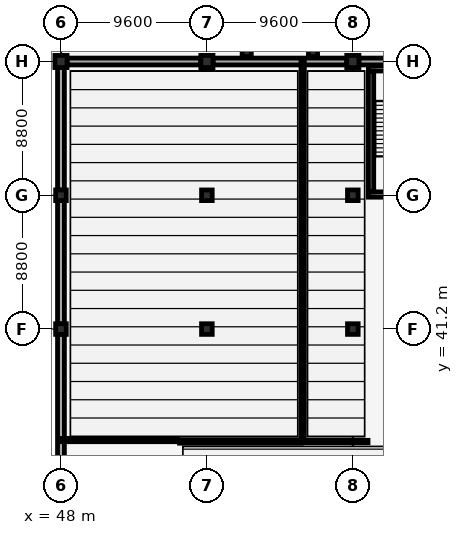
"""IFC4 building model, lengths in metres.
Left out: names, types, materials, properties, quantities, classifications, styles, units other than length and angle.
Written with IfcOpenShell. Run it as: python <this file> out.ifc"""

import sys

from ifc_helpers import new_model, si_unit, direction, frame, frame_2d, origin, origin_2d, place, context, subcontext, project, spatial, rectangle, extrude, element, fill, save


model = new_model("IFC4")
c1 = context("Model", 3, precision=1e-05, world=origin(), true_north=direction((0.0, 1.0)))
c2 = subcontext(c1, "Body", "Model", "MODEL_VIEW")
j1 = project(units=[si_unit("LENGTHUNIT", "METRE"), si_unit("PLANEANGLEUNIT", "RADIAN")], contexts=[c1])
p1 = place(None, origin())
s1 = spatial("IfcSite", under=j1, at=p1, CompositionType="ELEMENT")
p2 = place(p1, origin())
s2 = spatial("IfcBuilding", under=s1, at=p2, CompositionType="ELEMENT")
p3 = place(p2, frame((0.0, 0.0, -4.2)))
s3 = spatial("IfcBuildingStorey", under=s2, at=p3, CompositionType="ELEMENT", Elevation=-4.2)
for number, where, z_axis, x_axis in (
    (1, (48.0, 41.2, 0.0), (0.0, 0.0, 1.0), (1.0, 0.0, 0.0)),
    (2, (48.0, 50.0, 0.0), (0.0, 0.0, 1.0), (1.0, 0.0, 0.0)),
):
    element("IfcColumn", number, at=place(p3, frame(where, z_axis=z_axis, x_axis=x_axis)), inside=s3, PredefinedType="COLUMN", context=c2, shape_type="SweptSolid", body=[
        extrude(rectangle(XDim=0.7, YDim=0.7, at=origin_2d()), origin(), (0.0, 0.0, 1.0), 4.2),
    ])
p4 = place(p3, frame((48.0, 58.8, 0.0), z_axis=(0.0, 0.0, 1.0), x_axis=(1.0, 0.0, 0.0)))
e3 = element("IfcColumn", 3, at=p4, inside=s3, PredefinedType="COLUMN", context=c2, shape_type="SweptSolid", body=[
    extrude(rectangle(XDim=0.8, YDim=0.8, at=origin_2d()), origin(), (0.0, 0.0, 1.0), 4.2),
])
for number, where, z_axis, x_axis in (
    (4, (57.6, 41.2, 0.0), (0.0, 0.0, 1.0), (1.0, 0.0, 0.0)),
    (5, (57.6, 50.0, 0.0), (0.0, 0.0, 1.0), (1.0, 0.0, 0.0)),
):
    element("IfcColumn", number, at=place(p3, frame(where, z_axis=z_axis, x_axis=x_axis)), inside=s3, PredefinedType="COLUMN", context=c2, shape_type="SweptSolid", body=[
        extrude(rectangle(XDim=0.7, YDim=0.7, at=origin_2d()), origin(), (0.0, 0.0, 1.0), 4.2),
    ])
p5 = place(p3, frame((57.6, 58.8, 0.0), z_axis=(0.0, 0.0, 1.0), x_axis=(1.0, 0.0, 0.0)))
e6 = element("IfcColumn", 6, at=p5, inside=s3, PredefinedType="COLUMN", context=c2, shape_type="SweptSolid", body=[
    extrude(rectangle(XDim=0.8, YDim=0.8, at=origin_2d()), origin(), (0.0, 0.0, 1.0), 4.2),
])
for number, where, z_axis, x_axis in (
    (7, (67.2, 41.2, 0.0), (0.0, 0.0, 1.0), (1.0, 0.0, 0.0)),
    (8, (67.2, 50.0, 0.0), (0.0, 0.0, 1.0), (1.0, 0.0, 0.0)),
):
    element("IfcColumn", number, at=place(p3, frame(where, z_axis=z_axis, x_axis=x_axis)), inside=s3, PredefinedType="COLUMN", context=c2, shape_type="SweptSolid", body=[
        extrude(rectangle(XDim=0.7, YDim=0.7, at=origin_2d()), origin(), (0.0, 0.0, 1.0), 4.2),
    ])
p6 = place(p3, frame((67.2, 58.8, 0.0), z_axis=(0.0, 0.0, 1.0), x_axis=(1.0, 0.0, 0.0)))
e9 = element("IfcColumn", 9, at=p6, inside=s3, PredefinedType="COLUMN", context=c2, shape_type="SweptSolid", body=[
    extrude(rectangle(XDim=0.8, YDim=0.8, at=origin_2d()), origin(), (0.0, 0.0, 1.0), 4.2),
])
p7 = place(p3, frame((76.4, 58.8, 0.0), z_axis=(0.0, 0.0, 1.0), x_axis=(-1.0, 0.0, 0.0)))
e10 = element("IfcWall", 10, at=p7, inside=s3, PredefinedType="SOLIDWALL", context=c2, shape_type="SweptSolid", body=[
    extrude(rectangle(XDim=8.8, YDim=0.45, at=frame_2d((4.4, 0.0))), origin(), (0.0, 0.0, 1.0), 3.84),
])
for number, where, z_axis, x_axis in (
    (11, (66.8, 58.8, 0.0), (0.0, 0.0, 1.0), (-1.0, 0.0, 0.0)),
    (12, (57.2, 58.8, 0.0), (0.0, 0.0, 1.0), (-1.0, 0.0, 0.0)),
):
    element("IfcWall", number, at=place(p3, frame(where, z_axis=z_axis, x_axis=x_axis)), inside=s3, PredefinedType="SOLIDWALL", context=c2, shape_type="SweptSolid", body=[
        extrude(rectangle(XDim=8.8, YDim=0.45, at=frame_2d((4.4, 0.0))), origin(), (0.0, 0.0, 1.0), 3.84),
    ])
p8 = place(p3, frame((48.0, 58.4, 0.0), z_axis=(0.0, 0.0, 1.0), x_axis=(0.0, -1.0, 0.0)))
e13 = element("IfcWall", 13, at=p8, inside=s3, PredefinedType="SOLIDWALL", context=c2, shape_type="SweptSolid", body=[
    extrude(rectangle(XDim=8.05, YDim=0.45, at=frame_2d((4.025, 0.0))), origin(), (0.0, 0.0, 1.0), 3.84),
])
p9 = place(p3, frame((48.0, 49.65, 0.0), z_axis=(0.0, 0.0, 1.0), x_axis=(0.0, -1.0, 0.0)))
e14 = element("IfcWall", 14, at=p9, inside=s3, PredefinedType="SOLIDWALL", context=c2, shape_type="SweptSolid", body=[
    extrude(rectangle(XDim=8.1, YDim=0.45, at=frame_2d((4.05, 0.0))), origin(), (0.0, 0.0, 1.0), 3.84),
])
p10 = place(p3, frame((48.0, 40.85, 0.0), z_axis=(0.0, 0.0, 1.0), x_axis=(0.0, -1.0, 0.0)))
e15 = element("IfcWall", 15, at=p10, inside=s3, PredefinedType="SOLIDWALL", context=c2, shape_type="SweptSolid", body=[
    extrude(rectangle(XDim=8.1, YDim=0.45, at=frame_2d((4.05, 0.0))), origin(), (0.0, 0.0, 1.0), 3.84),
])
for number, where, z_axis, x_axis in (
    (16, (60.22, 59.42, 0.0), (0.0, 0.0, 1.0), (1.0, 0.0, 0.0)),
    (17, (64.58, 59.42, 0.0), (0.0, 0.0, 1.0), (1.0, 0.0, 0.0)),
):
    element("IfcColumn", number, at=place(p3, frame(where, z_axis=z_axis, x_axis=x_axis)), inside=s3, PredefinedType="COLUMN", context=c2, shape_type="SweptSolid", body=[
        extrude(rectangle(XDim=0.6, YDim=0.6, at=origin_2d()), origin(), (0.0, 0.0, 1.0), 4.2),
    ])
for number, where, z_axis, x_axis in (
    (18, (73.875, 50.05, 0.0), (0.0, 0.0, 1.0), (-1.0, 0.0, 0.0)),
    (19, (68.225, 58.35, 0.0), (0.0, 0.0, 1.0), (1.0, 0.0, 0.0)),
):
    element("IfcWall", number, at=place(p3, frame(where, z_axis=z_axis, x_axis=x_axis)), inside=s3, PredefinedType="SHEAR", context=c2, shape_type="SweptSolid", body=[
        extrude(rectangle(XDim=5.65, YDim=0.35, at=frame_2d((2.825, 0.0))), origin(), (0.0, 0.0, 1.0), 3.95),
    ])
p11 = place(p3, frame((68.4, 50.225, 0.0), z_axis=(0.0, 0.0, 1.0), x_axis=(0.0, 1.0, 0.0)))
e20 = element("IfcWall", 20, at=p11, inside=s3, PredefinedType="SHEAR", context=c2, shape_type="SweptSolid", body=[
    extrude(rectangle(XDim=7.95, YDim=0.35, at=frame_2d((3.975, 0.0))), origin(), (0.0, 0.0, 1.0), 3.95),
])
p12 = place(p11, frame((0.22, 0.0, 0.0)))
e21 = element("IfcOpeningElement", 21, at=p12, cuts=e20, PredefinedType="OPENING", context=c2, shape_type="SweptSolid", body=[
    extrude(rectangle(XDim=2.05, YDim=2.15, at=frame_2d((1.025, 1.075))), frame((0.0, 0.185, 0.0), z_axis=(0.0, -1.0, 0.0), x_axis=(1.0, 0.0, 0.0)), (0.0, 0.0, 1.0), 0.37),
])
p13 = place(p3, frame((64.0, 33.8, 0.0), z_axis=(0.0, 0.0, 1.0), x_axis=(1.0, 0.0, 0.0)))
e22 = element("IfcWall", 22, at=p13, inside=s3, PredefinedType="PARTITIONING", context=c2, shape_type="SweptSolid", body=[
    extrude(rectangle(XDim=4.2, YDim=0.16, at=frame_2d((2.1, 0.0))), origin(), (0.0, 0.0, 1.0), 3.84),
])
p14 = place(p13, frame((0.36, 0.0, 0.0)))
e23 = element("IfcOpeningElement", 23, at=p14, cuts=e22, PredefinedType="OPENING", context=c2, shape_type="SweptSolid", body=[
    extrude(rectangle(XDim=1.8, YDim=2.15, at=frame_2d((0.9, 1.075))), frame((0.0, 0.09, 0.0), z_axis=(0.0, -1.0, 0.0), x_axis=(1.0, 0.0, 0.0)), (0.0, 0.0, 1.0), 0.18),
])
p15 = place(p3, frame((55.8, 33.8, 0.0), z_axis=(0.0, 0.0, 1.0), x_axis=(1.0, 0.0, 0.0)))
e24 = element("IfcWall", 24, at=p15, inside=s3, PredefinedType="PARTITIONING", context=c2, shape_type="SweptSolid", body=[
    extrude(rectangle(XDim=8.0, YDim=0.22, at=frame_2d((4.0, 0.0))), origin(), (0.0, 0.0, 1.0), 3.84),
])
p16 = place(p15, frame((3.25, 0.0, 0.0)))
e25 = element("IfcOpeningElement", 25, at=p16, cuts=e24, PredefinedType="OPENING", context=c2, shape_type="SweptSolid", body=[
    extrude(rectangle(XDim=1.5, YDim=2.2, at=frame_2d((0.75, 1.1))), frame((0.0, 0.12, 0.0), z_axis=(0.0, -1.0, 0.0), x_axis=(1.0, 0.0, 0.0)), (0.0, 0.0, 1.0), 0.24),
])
p17 = place(p3, frame((63.9, 33.9, 0.0), z_axis=(0.0, 0.0, 1.0), x_axis=(0.0, 1.0, 0.0)))
e26 = element("IfcWall", 26, at=p17, inside=s3, PredefinedType="PARTITIONING", context=c2, shape_type="SweptSolid", body=[
    extrude(rectangle(XDim=24.85, YDim=0.22, at=frame_2d((12.425, 0.0))), origin(), (0.0, 0.0, 1.0), 3.84),
])
p18 = place(p17, frame((11.675, 0.0, 0.0)))
e27 = element("IfcOpeningElement", 27, at=p18, cuts=e26, PredefinedType="OPENING", context=c2, shape_type="SweptSolid", body=[
    extrude(rectangle(XDim=1.5, YDim=2.2, at=frame_2d((0.75, 1.1))), frame((0.0, 0.12, 0.0), z_axis=(0.0, -1.0, 0.0), x_axis=(1.0, 0.0, 0.0)), (0.0, 0.0, 1.0), 0.24),
])
p19 = place(p3, frame((48.05, 33.9, 0.0), z_axis=(0.0, 0.0, 1.0), x_axis=(1.0, 0.0, 0.0)))
e28 = element("IfcWall", 28, at=p19, inside=s3, PredefinedType="PARTITIONING", context=c2, shape_type="SweptSolid", body=[
    extrude(rectangle(XDim=7.61, YDim=0.22, at=frame_2d((3.805, 0.0))), origin(), (0.0, 0.0, 1.0), 3.84),
])
p20 = place(p3, frame((57.34, 58.4, 0.0), z_axis=(0.0, 0.0, 1.0), x_axis=(1.0, 0.0, 0.0)))
e29 = element("IfcWall", 29, at=p20, inside=s3, PredefinedType="PARTITIONING", context=c2, shape_type="SweptSolid", body=[
    extrude(rectangle(XDim=0.52, YDim=0.22, at=frame_2d((0.26, 0.0))), origin(), (0.0, 0.0, 1.0), 3.84),
])
p21 = place(p12, origin())
e30 = element("IfcDoor", 30, at=p21, inside=s3, OperationType="DOUBLE_DOOR_SINGLE_SWING", PredefinedType="DOOR", context=c2, shape_type="SweptSolid", body=[
    extrude(rectangle(XDim=2.05, YDim=2.15, at=frame_2d((1.025, 1.075))), frame((0.0, 0.025, 0.0), z_axis=(0.0, -1.0, 0.0), x_axis=(1.0, 0.0, 0.0)), (0.0, 0.0, 1.0), 0.05),
])
fill(e21, e30)
p22 = place(p14, origin())
e31 = element("IfcDoor", 31, at=p22, inside=s3, OperationType="DOUBLE_DOOR_SINGLE_SWING", PredefinedType="DOOR", context=c2, shape_type="SweptSolid", body=[
    extrude(rectangle(XDim=1.8, YDim=2.15, at=frame_2d((0.9, 1.075))), frame((0.0, 0.025, 0.0), z_axis=(0.0, -1.0, 0.0), x_axis=(1.0, 0.0, 0.0)), (0.0, 0.0, 1.0), 0.05),
])
fill(e23, e31)
p23 = place(p16, origin())
e32 = element("IfcDoor", 32, at=p23, inside=s3, OperationType="SLIDING_TO_RIGHT", PredefinedType="DOOR", context=c2, shape_type="SweptSolid", body=[
    extrude(rectangle(XDim=1.5, YDim=2.2, at=frame_2d((0.75, 1.1))), frame((0.0, 0.025, 0.0), z_axis=(0.0, -1.0, 0.0), x_axis=(1.0, 0.0, 0.0)), (0.0, 0.0, 1.0), 0.05),
])
fill(e25, e32)
p24 = place(p18, origin())
e33 = element("IfcDoor", 33, at=p24, inside=s3, OperationType="SLIDING_TO_RIGHT", PredefinedType="DOOR", context=c2, shape_type="SweptSolid", body=[
    extrude(rectangle(XDim=1.5, YDim=2.2, at=frame_2d((0.75, 1.1))), frame((0.0, 0.025, 0.0), z_axis=(0.0, -1.0, 0.0), x_axis=(1.0, 0.0, 0.0)), (0.0, 0.0, 1.0), 0.05),
])
fill(e27, e33)
save(model, sys.argv[1])
